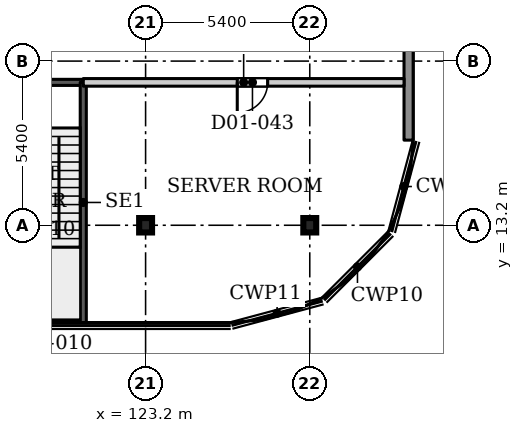
"""IFC4 building model, lengths in metres.
Left out: names, types, materials, properties, quantities, classifications, styles, units other than length and angle.
Written with IfcOpenShell. Run it as: python <this file> out.ifc"""

import sys

from ifc_helpers import new_model, si_unit, direction, frame, frame_2d, origin, origin_2d, place, context, subcontext, project, spatial, rectangle, i_section, extrude, source, transform, mapped, element, fill, save


model = new_model("IFC4")
c1 = context("Model", 3, precision=1e-05, world=origin(), true_north=direction((0.0, 1.0)))
c2 = subcontext(c1, "Body", "Model", "MODEL_VIEW")
j1 = project(units=[si_unit("LENGTHUNIT", "METRE"), si_unit("PLANEANGLEUNIT", "RADIAN")], contexts=[c1])
p1 = place(None, origin())
s1 = spatial("IfcSite", under=j1, at=p1, CompositionType="ELEMENT")
p2 = place(p1, origin())
s2 = spatial("IfcBuilding", under=s1, at=p2, CompositionType="ELEMENT")
p3 = place(p2, frame((0.0, 0.0, 7.5)))
s3 = spatial("IfcBuildingStorey", under=s2, at=p3, CompositionType="ELEMENT", Elevation=7.5)
for number, where, z_axis, x_axis in (
    (1, (123.2, 13.2, 0.0), (0.0, 0.0, 1.0), (1.0, 0.0, 0.0)),
    (2, (128.6, 13.2, 0.0), (0.0, 0.0, 1.0), (1.0, 0.0, 0.0)),
):
    element("IfcColumn", number, at=place(p3, frame(where, z_axis=z_axis, x_axis=x_axis)), inside=s3, PredefinedType="COLUMN", context=c2, shape_type="SweptSolid", body=[
        extrude(i_section(OverallWidth=0.424, OverallDepth=0.474, WebThickness=0.048, FlangeThickness=0.077, FilletRadius=0.014, at=origin_2d()), origin(), (0.0, 0.0, 1.0), 5.0),
    ])
p4 = place(p3, frame((131.85, 54.72, 0.0), z_axis=(0.0, 0.0, 1.0), x_axis=(0.0, -1.0, 0.0)))
e3 = element("IfcWall", 3, at=p4, inside=s3, PredefinedType="SOLIDWALL", context=c2, shape_type="SweptSolid", body=[
    extrude(rectangle(XDim=38.72, YDim=0.3, at=frame_2d((19.36, 0.0))), origin(), (0.0, 0.0, 1.0), 4.75),
])
p5 = place(p4, frame((2.435, 0.0, 0.6)))
e4 = element("IfcOpeningElement", 4, at=p5, cuts=e3, PredefinedType="OPENING", context=c2, shape_type="SweptSolid", body=[
    extrude(rectangle(XDim=2.7, YDim=3.0, at=frame_2d((1.35, 1.5))), frame((0.0, 0.16, 0.0), z_axis=(0.0, -1.0, 0.0), x_axis=(1.0, 0.0, 0.0)), (0.0, 0.0, 1.0), 0.32),
])
p6 = place(p4, frame((13.58, 0.0, 0.6)))
e5 = element("IfcOpeningElement", 5, at=p6, cuts=e3, PredefinedType="OPENING", context=c2, shape_type="SweptSolid", body=[
    extrude(rectangle(XDim=2.7, YDim=3.0, at=frame_2d((1.35, 1.5))), frame((0.0, 0.16, 0.0), z_axis=(0.0, -1.0, 0.0), x_axis=(1.0, 0.0, 0.0)), (0.0, 0.0, 1.0), 0.32),
])
p7 = place(p4, frame((26.16, 0.0, 0.6)))
e6 = element("IfcOpeningElement", 6, at=p7, cuts=e3, PredefinedType="OPENING", context=c2, shape_type="SweptSolid", body=[
    extrude(rectangle(XDim=2.7, YDim=3.0, at=frame_2d((1.35, 1.5))), frame((0.0, 0.16, 0.0), z_axis=(0.0, -1.0, 0.0), x_axis=(1.0, 0.0, 0.0)), (0.0, 0.0, 1.0), 0.32),
])
p8 = place(p3, frame((118.0, 17.9, 0.0), z_axis=(0.0, 0.0, 1.0), x_axis=(1.0, 0.0, 0.0)))
e7 = element("IfcWall", 7, at=p8, inside=s3, PredefinedType="SHEAR", context=c2, shape_type="SweptSolid", body=[
    extrude(rectangle(XDim=3.15, YDim=0.2, at=frame_2d((1.575, 0.0))), origin(), (0.0, 0.0, 1.0), 5.0),
])
p9 = place(p8, frame((0.95, 0.0, 0.0)))
e8 = element("IfcOpeningElement", 8, at=p9, cuts=e7, PredefinedType="OPENING", context=c2, shape_type="SweptSolid", body=[
    extrude(rectangle(XDim=1.1, YDim=2.2, at=frame_2d((0.55, 1.1))), frame((0.0, 0.11, 0.0), z_axis=(0.0, -1.0, 0.0), x_axis=(1.0, 0.0, 0.0)), (0.0, 0.0, 1.0), 0.22),
])
p10 = place(p3, frame((121.15, 10.0, 0.0), z_axis=(0.0, 0.0, 1.0), x_axis=(0.0, 1.0, 0.0)))
e9 = element("IfcWall", 9, at=p10, inside=s3, PredefinedType="SHEAR", context=c2, shape_type="SweptSolid", body=[
    extrude(rectangle(XDim=7.9, YDim=0.2, at=frame_2d((3.95, 0.0))), origin(), (0.0, 0.0, 1.0), 5.0),
])
p11 = place(p3, frame((121.15, 17.9, 0.0), z_axis=(0.0, 0.0, 1.0), x_axis=(1.0, 0.0, 0.0)))
e10 = element("IfcWall", 10, at=p11, inside=s3, PredefinedType="PARTITIONING", context=c2, shape_type="SweptSolid", body=[
    extrude(rectangle(XDim=10.551, YDim=0.25, at=frame_2d((5.275, 0.0))), origin(), (0.0, 0.0, 1.0), 4.68),
])
p12 = place(p11, frame((5.065, 0.0, 0.0)))
e11 = element("IfcOpeningElement", 11, at=p12, cuts=e10, PredefinedType="OPENING", context=c2, shape_type="SweptSolid", body=[
    extrude(rectangle(XDim=1.0, YDim=2.1, at=frame_2d((0.5, 1.05))), frame((0.0, 0.135, 0.0), z_axis=(0.0, -1.0, 0.0), x_axis=(1.0, 0.0, 0.0)), (0.0, 0.0, 1.0), 0.27),
])
m1 = source(origin(), c2, "Body", "SweptSolid", [
    extrude(rectangle(XDim=1.0, YDim=2.1, at=frame_2d((0.5, 1.05))), frame((0.0, 0.025, 0.0), z_axis=(0.0, -1.0, 0.0), x_axis=(1.0, 0.0, 0.0)), (0.0, 0.0, 1.0), 0.05),
])
p13 = place(p12, origin())
e12 = element("IfcDoor", 12, at=p13, inside=s3, OperationType="SINGLE_SWING_RIGHT", PredefinedType="DOOR", context=c2, shape_type="MappedRepresentation", body=[
    mapped(m1, transform((0.0, 0.0, 0.0), x_axis=(1.0, 0.0, 0.0), y_axis=(0.0, 1.0, 0.0), z_axis=(0.0, 0.0, 1.0), scale=1.0)),
])
fill(e11, e12)
save(model, sys.argv[1])
